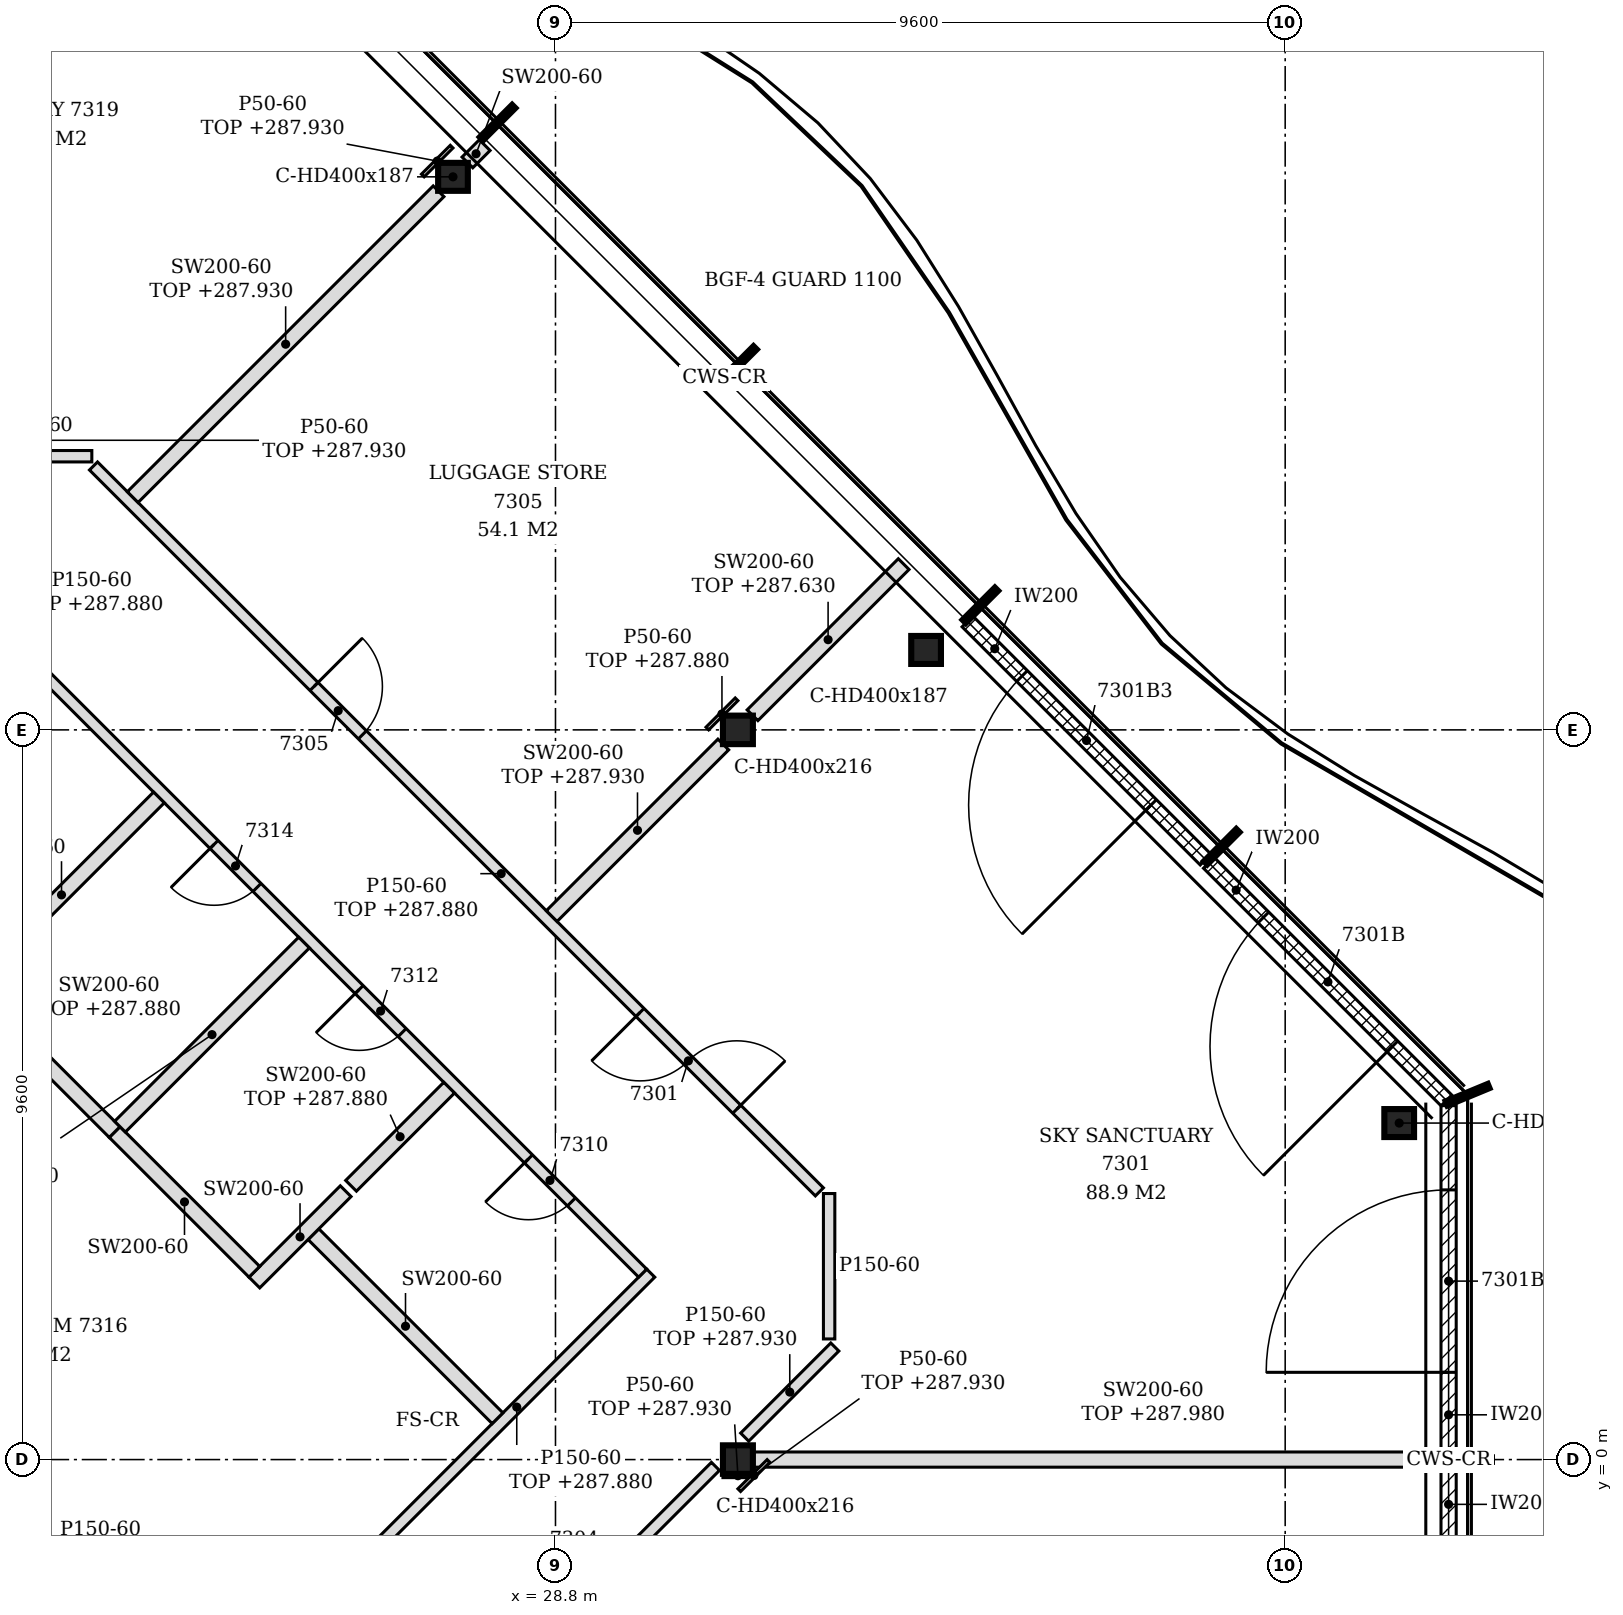
"""IFC4 building model, lengths in metres.
Left out: names, types, materials, properties, quantities, classifications, styles, units other than length and angle.
Written with IfcOpenShell. Run it as: python <this file> out.ifc"""

import sys

from ifc_helpers import new_model, si_unit, direction, frame, frame_2d, origin, origin_2d, place, context, subcontext, project, spatial, polyline, rectangle, i_section, outline, extrude, element, fill, save


model = new_model("IFC4")
c1 = context("Model", 3, precision=1e-05, world=origin(), true_north=direction((0.0, 1.0)))
c2 = subcontext(c1, "Body", "Model", "MODEL_VIEW")
j1 = project(units=[si_unit("LENGTHUNIT", "METRE"), si_unit("PLANEANGLEUNIT", "RADIAN")], contexts=[c1])
p1 = place(None, origin())
s1 = spatial("IfcSite", under=j1, at=p1, CompositionType="ELEMENT")
p2 = place(p1, origin())
s2 = spatial("IfcBuilding", under=s1, at=p2, CompositionType="ELEMENT")
p3 = place(p2, frame((0.0, 0.0, 285.0)))
s3 = spatial("IfcBuildingStorey", under=s2, at=p3, CompositionType="ELEMENT", Elevation=285.0)
for number, where, z_axis, x_axis in (
    (1, (39.9, 4.427, -0.15), (0.0, 0.0, 1.0), (1.0, 0.0, 0.0)),
    (2, (33.676, 10.652, -0.15), (0.0, 0.0, 1.0), (1.0, 0.0, 0.0)),
    (3, (27.451, 16.876, -0.15), (0.0, 0.0, 1.0), (1.0, 0.0, 0.0)),
):
    element("IfcColumn", number, at=place(p3, frame(where, z_axis=z_axis, x_axis=x_axis)), inside=s3, PredefinedType="COLUMN", context=c2, shape_type="SweptSolid", body=[
        extrude(i_section(OverallWidth=0.391, OverallDepth=0.368, WebThickness=0.015, FlangeThickness=0.024, FilletRadius=0.015, at=origin_2d()), origin(), (0.0, 0.0, 1.0), 3.6),
    ])
for number, where, z_axis, x_axis in (
    (4, (31.2, 0.0, -0.15), (0.0, 0.0, 1.0), (1.0, 0.0, 0.0)),
    (5, (31.2, 9.6, -0.15), (0.0, 0.0, 1.0), (1.0, 0.0, 0.0)),
):
    element("IfcColumn", number, at=place(p3, frame(where, z_axis=z_axis, x_axis=x_axis)), inside=s3, PredefinedType="COLUMN", context=c2, shape_type="SweptSolid", body=[
        extrude(i_section(OverallWidth=0.394, OverallDepth=0.375, WebThickness=0.017, FlangeThickness=0.028, FilletRadius=0.015, at=origin_2d()), origin(), (0.0, 0.0, 1.0), 3.6),
    ])
p4 = place(p3, frame((40.55, -4.656, 0.0), z_axis=(0.0, 0.0, 1.0), x_axis=(0.0, 1.0, 0.0)))
e6 = element("IfcWall", 6, at=p4, inside=s3, PredefinedType="NOTDEFINED", context=c2, shape_type="SweptSolid", body=[
    extrude(rectangle(XDim=4.626, YDim=0.2, at=frame_2d((2.313, 0.0))), origin(), (0.0, 0.0, 1.0), 3.45),
])
p5 = place(p4, frame((1.108, 0.0, 0.0)))
e7 = element("IfcOpeningElement", 7, at=p5, cuts=e6, PredefinedType="OPENING", context=c2, shape_type="SweptSolid", body=[
    extrude(rectangle(XDim=2.4, YDim=2.4, at=frame_2d((1.2, 1.2))), frame((0.0, 0.11, 0.0), z_axis=(0.0, -1.0, 0.0), x_axis=(1.0, 0.0, 0.0)), (0.0, 0.0, 1.0), 0.22),
])
p6 = place(p3, frame((40.55, 0.03, 0.0), z_axis=(0.0, 0.0, 1.0), x_axis=(0.0, 1.0, 0.0)))
e8 = element("IfcWall", 8, at=p6, inside=s3, PredefinedType="NOTDEFINED", context=c2, shape_type="SweptSolid", body=[
    extrude(rectangle(XDim=4.626, YDim=0.2, at=frame_2d((2.313, 0.0))), origin(), (0.0, 0.0, 1.0), 3.45),
])
p7 = place(p6, frame((1.118, 0.0, 0.0)))
e9 = element("IfcOpeningElement", 9, at=p7, cuts=e8, PredefinedType="OPENING", context=c2, shape_type="SweptSolid", body=[
    extrude(rectangle(XDim=2.4, YDim=2.4, at=frame_2d((1.2, 1.2))), frame((0.0, 0.11, 0.0), z_axis=(0.0, -1.0, 0.0), x_axis=(1.0, 0.0, 0.0)), (0.0, 0.0, 1.0), 0.22),
])
p8 = place(p3, frame((40.522, 4.725, 0.0), z_axis=(0.0, 0.0, 1.0), x_axis=(-0.707106781187, 0.707106781187, 0.0)))
e10 = element("IfcWall", 10, at=p8, inside=s3, PredefinedType="NOTDEFINED", context=c2, shape_type="SweptSolid", body=[
    extrude(rectangle(XDim=4.421, YDim=0.2, at=frame_2d((2.21, 0.0))), origin(), (0.0, 0.0, 1.0), 3.45),
])
p9 = place(p8, frame((1.005, 0.0, 0.0)))
e11 = element("IfcOpeningElement", 11, at=p9, cuts=e10, PredefinedType="OPENING", context=c2, shape_type="SweptSolid", body=[
    extrude(rectangle(XDim=2.4, YDim=2.4, at=frame_2d((1.2, 1.2))), frame((0.0, 0.11, 0.0), z_axis=(0.0, -1.0, 0.0), x_axis=(1.0, 0.0, 0.0)), (0.0, 0.0, 1.0), 0.22),
])
p10 = place(p3, frame((37.353, 7.893, 0.0), z_axis=(0.0, 0.0, 1.0), x_axis=(-0.707134329907, 0.707079231393, 0.0)))
e12 = element("IfcWall", 12, at=p10, inside=s3, PredefinedType="NOTDEFINED", context=c2, shape_type="SweptSolid", body=[
    extrude(rectangle(XDim=4.431, YDim=0.2, at=frame_2d((2.215, 0.0))), origin(), (0.0, 0.0, 1.0), 3.45),
])
p11 = place(p10, frame((1.015, 0.0, 0.0)))
e13 = element("IfcOpeningElement", 13, at=p11, cuts=e12, PredefinedType="OPENING", context=c2, shape_type="SweptSolid", body=[
    extrude(rectangle(XDim=2.4, YDim=2.4, at=frame_2d((1.2, 1.2))), frame((0.0, 0.11, 0.0), z_axis=(0.0, -1.0, 0.0), x_axis=(1.0, 0.0, 0.0)), (0.0, 0.0, 1.0), 0.22),
])
p12 = place(p3, frame((15.497, -15.497, 0.0), z_axis=(0.0, 0.0, 1.0), x_axis=(0.707106781187, 0.707106781187, 0.0)))
e14 = element("IfcWall", 14, at=p12, inside=s3, PredefinedType="PARTITIONING", context=c2, shape_type="SweptSolid", body=[
    extrude(rectangle(XDim=21.79, YDim=0.15, at=frame_2d((10.895, 0.0))), origin(), (0.0, 0.0, 1.0), 2.73),
])
p13 = place(p12, frame((4.927, 0.0, 0.0)))
e15 = element("IfcOpeningElement", 15, at=p13, cuts=e14, PredefinedType="OPENING", context=c2, shape_type="SweptSolid", body=[
    extrude(rectangle(XDim=0.9, YDim=2.1, at=frame_2d((0.45, 1.05))), frame((0.0, 0.085, 0.0), z_axis=(0.0, -1.0, 0.0), x_axis=(1.0, 0.0, 0.0)), (0.0, 0.0, 1.0), 0.17),
])
p14 = place(p12, frame((10.926, 0.0, 0.0)))
e16 = element("IfcOpeningElement", 16, at=p14, cuts=e14, PredefinedType="OPENING", context=c2, shape_type="SweptSolid", body=[
    extrude(rectangle(XDim=0.9, YDim=2.1, at=frame_2d((0.45, 1.05))), frame((0.0, 0.085, 0.0), z_axis=(0.0, -1.0, 0.0), x_axis=(1.0, 0.0, 0.0)), (0.0, 0.0, 1.0), 0.17),
])
p15 = place(p12, frame((19.345, 0.0, 0.0)))
e17 = element("IfcOpeningElement", 17, at=p15, cuts=e14, PredefinedType="OPENING", context=c2, shape_type="SweptSolid", body=[
    extrude(rectangle(XDim=0.9, YDim=2.1, at=frame_2d((0.45, 1.05))), frame((0.0, 0.085, 0.0), z_axis=(0.0, -1.0, 0.0), x_axis=(1.0, 0.0, 0.0)), (0.0, 0.0, 1.0), 0.17),
])
p16 = place(p3, frame((26.528, -1.072, 0.0), z_axis=(0.0, 0.0, 1.0), x_axis=(0.707106781187, 0.707106781187, 0.0)))
e18 = element("IfcWall", 18, at=p16, inside=s3, PredefinedType="PARTITIONING", context=c2, shape_type="SweptSolid", body=[
    extrude(rectangle(XDim=4.985, YDim=0.15, at=frame_2d((2.492, 0.0))), origin(), (0.0, 0.0, 1.0), 2.88),
])
p17 = place(p3, frame((31.397, 0.0, 0.0), z_axis=(0.0, 0.0, 1.0), x_axis=(1.0, 0.0, 0.0)))
e19 = element("IfcWall", 19, at=p17, inside=s3, PredefinedType="PARTITIONING", context=c2, shape_type="SweptSolid", body=[
    extrude(outline(polyline([(0.0, 0.0), (9.053, 0.0), (9.053, 2.98), (8.653, 2.98), (8.651, 2.93), (8.353, 2.93), (8.351, 2.98), (0.0, 2.98), (0.0, 0.0)])), frame((0.0, 0.1, 0.0), z_axis=(0.0, -1.0, 0.0), x_axis=(1.0, 0.0, 0.0)), (0.0, 0.0, 1.0), 0.2),
])
p18 = place(p3, frame((31.289, 0.295, 0.0), z_axis=(0.0, 0.0, 1.0), x_axis=(0.707179577478, 0.7070339774, 0.0)))
e20 = element("IfcWall", 20, at=p18, inside=s3, PredefinedType="PARTITIONING", context=c2, shape_type="SweptSolid", body=[
    extrude(rectangle(XDim=1.677, YDim=0.15, at=frame_2d((0.838, 0.0))), origin(), (0.0, 0.0, 1.0), 2.93),
])
p19 = place(p3, frame((28.038, 0.544, 0.0), z_axis=(0.0, 0.0, 1.0), x_axis=(-0.707213699878, 0.706999846325, 0.0)))
e21 = element("IfcWall", 21, at=p19, inside=s3, PredefinedType="PARTITIONING", context=c2, shape_type="SweptSolid", body=[
    extrude(rectangle(XDim=3.425, YDim=0.2, at=frame_2d((1.712, 0.0))), origin(), (0.0, 0.0, 1.0), 3.45),
])
p20 = place(p3, frame((32.4, 1.587, 0.0), z_axis=(0.0, 0.0, 1.0), x_axis=(0.0, 1.0, 0.0)))
e22 = element("IfcWall", 22, at=p20, inside=s3, PredefinedType="PARTITIONING", context=c2, shape_type="SweptSolid", body=[
    extrude(rectangle(XDim=1.913, YDim=0.15, at=frame_2d((0.957, 0.0))), origin(), (0.0, 0.0, 1.0), 3.45),
])
p21 = place(p3, frame((24.838, 2.329, 0.0), z_axis=(0.0, 0.0, 1.0), x_axis=(0.707034938994, 0.70717861608, 0.0)))
e23 = element("IfcWall", 23, at=p21, inside=s3, PredefinedType="PARTITIONING", context=c2, shape_type="SweptSolid", body=[
    extrude(rectangle(XDim=1.699, YDim=0.2, at=frame_2d((0.85, 0.0))), origin(), (0.0, 0.0, 1.0), 3.45),
])
p22 = place(p3, frame((24.838, 2.471, 0.0), z_axis=(0.0, 0.0, 1.0), x_axis=(-0.707106781187, 0.707106781187, 0.0)))
e24 = element("IfcWall", 24, at=p22, inside=s3, PredefinedType="PARTITIONING", context=c2, shape_type="SweptSolid", body=[
    extrude(rectangle(XDim=2.6, YDim=0.2, at=frame_2d((1.3, 0.0))), origin(), (0.0, 0.0, 1.0), 3.45),
])
p23 = place(p3, frame((29.947, 2.453, 0.0), z_axis=(0.0, 0.0, 1.0), x_axis=(-0.707098603185, 0.707114959093, 0.0)))
e25 = element("IfcWall", 25, at=p23, inside=s3, PredefinedType="PARTITIONING", context=c2, shape_type="SweptSolid", body=[
    extrude(rectangle(XDim=14.927, YDim=0.15, at=frame_2d((7.463, 0.0))), origin(), (0.0, 0.0, 1.0), 2.88),
])
p24 = place(p23, frame((1.325, 0.0, 0.0)))
e26 = element("IfcOpeningElement", 26, at=p24, cuts=e25, PredefinedType="OPENING", context=c2, shape_type="SweptSolid", body=[
    extrude(rectangle(XDim=0.8, YDim=2.1, at=frame_2d((0.4, 1.05))), frame((0.0, 0.085, 0.0), z_axis=(0.0, -1.0, 0.0), x_axis=(1.0, 0.0, 0.0)), (0.0, 0.0, 1.0), 0.17),
])
p25 = place(p23, frame((4.476, 0.0, 0.0)))
e27 = element("IfcOpeningElement", 27, at=p25, cuts=e25, PredefinedType="OPENING", context=c2, shape_type="SweptSolid", body=[
    extrude(rectangle(XDim=0.8, YDim=2.1, at=frame_2d((0.4, 1.05))), frame((0.0, 0.085, 0.0), z_axis=(0.0, -1.0, 0.0), x_axis=(1.0, 0.0, 0.0)), (0.0, 0.0, 1.0), 0.17),
])
p26 = place(p23, frame((7.175, 0.0, 0.0)))
e28 = element("IfcOpeningElement", 28, at=p26, cuts=e25, PredefinedType="OPENING", context=c2, shape_type="SweptSolid", body=[
    extrude(rectangle(XDim=0.8, YDim=2.1, at=frame_2d((0.4, 1.05))), frame((0.0, 0.085, 0.0), z_axis=(0.0, -1.0, 0.0), x_axis=(1.0, 0.0, 0.0)), (0.0, 0.0, 1.0), 0.17),
])
p27 = place(p3, frame((32.272, 3.522, 0.0), z_axis=(0.0, 0.0, 1.0), x_axis=(-0.707097742657, 0.707115819601, 0.0)))
e29 = element("IfcWall", 29, at=p27, inside=s3, PredefinedType="PARTITIONING", context=c2, shape_type="SweptSolid", body=[
    extrude(rectangle(XDim=13.506, YDim=0.15, at=frame_2d((6.753, 0.0))), origin(), (0.0, 0.0, 1.0), 2.88),
])
p28 = place(p27, frame((1.538, 0.0, 0.0)))
e30 = element("IfcOpeningElement", 30, at=p28, cuts=e29, PredefinedType="OPENING", context=c2, shape_type="SweptSolid", body=[
    extrude(rectangle(XDim=1.8, YDim=2.1, at=frame_2d((0.9, 1.05))), frame((0.0, 0.085, 0.0), z_axis=(0.0, -1.0, 0.0), x_axis=(1.0, 0.0, 0.0)), (0.0, 0.0, 1.0), 0.17),
])
p29 = place(p27, frame((8.503, 0.0, 0.0)))
e31 = element("IfcOpeningElement", 31, at=p29, cuts=e29, PredefinedType="OPENING", context=c2, shape_type="SweptSolid", body=[
    extrude(rectangle(XDim=0.9, YDim=2.1, at=frame_2d((0.45, 1.05))), frame((0.0, 0.085, 0.0), z_axis=(0.0, -1.0, 0.0), x_axis=(1.0, 0.0, 0.0)), (0.0, 0.0, 1.0), 0.17),
])
p30 = place(p3, frame((26.111, 3.602, 0.0), z_axis=(0.0, 0.0, 1.0), x_axis=(0.706906117117, 0.707307388328, 0.0)))
e32 = element("IfcWall", 32, at=p30, inside=s3, PredefinedType="PARTITIONING", context=c2, shape_type="SweptSolid", body=[
    extrude(rectangle(XDim=1.825, YDim=0.2, at=frame_2d((0.913, 0.0))), origin(), (0.0, 0.0, 1.0), 2.88),
])
p31 = place(p3, frame((23.0, 4.309, 0.0), z_axis=(0.0, 0.0, 1.0), x_axis=(-0.707294541873, 0.70691897063, 0.0)))
e33 = element("IfcWall", 33, at=p31, inside=s3, PredefinedType="PARTITIONING", context=c2, shape_type="SweptSolid", body=[
    extrude(rectangle(XDim=2.6, YDim=0.2, at=frame_2d((1.3, 0.0))), origin(), (0.0, 0.0, 1.0), 2.88),
])
p32 = place(p3, frame((23.071, 4.38, 0.0), z_axis=(0.0, 0.0, 1.0), x_axis=(0.706928547439, 0.70728497002, 0.0)))
e34 = element("IfcWall", 34, at=p32, inside=s3, PredefinedType="PARTITIONING", context=c2, shape_type="SweptSolid", body=[
    extrude(rectangle(XDim=3.425, YDim=0.2, at=frame_2d((1.712, 0.0))), origin(), (0.0, 0.0, 1.0), 2.88),
])
p33 = place(p3, frame((21.019, 6.147, 0.0), z_axis=(0.0, 0.0, 1.0), x_axis=(0.707106781187, 0.707106781187, 0.0)))
e35 = element("IfcWall", 35, at=p33, inside=s3, PredefinedType="PARTITIONING", context=c2, shape_type="SweptSolid", body=[
    extrude(rectangle(XDim=3.626, YDim=0.2, at=frame_2d((1.813, 0.0))), origin(), (0.0, 0.0, 1.0), 3.45),
])
p34 = place(p3, frame((28.75, 7.15, 0.0), z_axis=(0.0, 0.0, 1.0), x_axis=(0.707106781187, 0.707106781187, 0.0)))
e36 = element("IfcWall", 36, at=p34, inside=s3, PredefinedType="PARTITIONING", context=c2, shape_type="SweptSolid", body=[
    extrude(rectangle(XDim=3.193, YDim=0.2, at=frame_2d((1.597, 0.0))), origin(), (0.0, 0.0, 1.0), 2.93),
])
p35 = place(p3, frame((31.392, 9.792, 0.0), z_axis=(0.0, 0.0, 1.0), x_axis=(0.707106781187, 0.707106781187, 0.0)))
e37 = element("IfcWall", 37, at=p35, inside=s3, PredefinedType="PARTITIONING", context=c2, shape_type="SweptSolid", body=[
    extrude(rectangle(XDim=2.812, YDim=0.2, at=frame_2d((1.406, 0.0))), origin(), (0.0, 0.0, 1.0), 2.63),
])
p36 = place(p3, frame((23.238, 12.662, 0.0), z_axis=(0.0, 0.0, 1.0), x_axis=(0.707106781187, 0.707106781187, 0.0)))
e38 = element("IfcWall", 38, at=p36, inside=s3, PredefinedType="PARTITIONING", context=c2, shape_type="SweptSolid", body=[
    extrude(rectangle(XDim=5.69, YDim=0.2, at=frame_2d((2.845, 0.0))), origin(), (0.0, 0.0, 1.0), 2.93),
])
p37 = place(p3, frame((19.397, 13.2, 0.0), z_axis=(0.0, 0.0, 1.0), x_axis=(1.0, 0.0, 0.0)))
e39 = element("IfcWall", 39, at=p37, inside=s3, PredefinedType="PARTITIONING", context=c2, shape_type="SweptSolid", body=[
    extrude(rectangle(XDim=3.303, YDim=0.15, at=frame_2d((1.652, 0.0))), origin(), (0.0, 0.0, 1.0), 3.45),
])
p38 = place(p37, frame((1.05, 0.0, 0.0)))
e40 = element("IfcOpeningElement", 40, at=p38, cuts=e39, PredefinedType="OPENING", context=c2, shape_type="SweptSolid", body=[
    extrude(rectangle(XDim=0.9, YDim=2.1, at=frame_2d((0.45, 1.05))), frame((0.0, 0.085, 0.0), z_axis=(0.0, -1.0, 0.0), x_axis=(1.0, 0.0, 0.0)), (0.0, 0.0, 1.0), 0.17),
])
p39 = place(p3, frame((27.641, 17.065, 0.0), z_axis=(0.0, 0.0, 1.0), x_axis=(0.707106781187, 0.707106781187, 0.0)))
e41 = element("IfcWall", 41, at=p39, inside=s3, PredefinedType="PARTITIONING", context=c2, shape_type="SweptSolid", body=[
    extrude(rectangle(XDim=0.322, YDim=0.2, at=frame_2d((0.161, 0.0))), origin(), (0.0, 0.0, 1.0), 3.45),
])
p40 = place(p3, frame((31.218, -0.402, 0.0), z_axis=(0.0, 0.0, 1.0), x_axis=(0.707106781187, 0.707106781187, 0.0)))
e42 = element("IfcWall", 42, at=p40, inside=s3, PredefinedType="PARTITIONING", context=c2, shape_type="SweptSolid", body=[
    extrude(rectangle(XDim=0.544, YDim=0.05, at=frame_2d((0.272, 0.0))), origin(), (0.0, 0.0, 1.0), 2.93),
])
p41 = place(p3, frame((31.003, -0.212, 0.0), z_axis=(0.0, 0.0, 1.0), x_axis=(1.0, 0.0, 0.0)))
e43 = element("IfcWall", 43, at=p41, inside=s3, PredefinedType="PARTITIONING", context=c2, shape_type="SweptSolid", body=[
    extrude(rectangle(XDim=0.394, YDim=0.05, at=frame_2d((0.197, 0.0))), origin(), (0.0, 0.0, 1.0), 2.93),
])
p42 = place(p3, frame((30.798, 9.618, 0.0), z_axis=(0.0, 0.0, 1.0), x_axis=(0.707106781187, 0.707106781187, 0.0)))
e44 = element("IfcWall", 44, at=p42, inside=s3, PredefinedType="PARTITIONING", context=c2, shape_type="SweptSolid", body=[
    extrude(rectangle(XDim=0.544, YDim=0.05, at=frame_2d((0.272, 0.0))), origin(), (0.0, 0.0, 1.0), 2.88),
])
p43 = place(p3, frame((27.054, 16.893, 0.0), z_axis=(0.0, 0.0, 1.0), x_axis=(0.707106781187, 0.707106781187, 0.0)))
e45 = element("IfcWall", 45, at=p43, inside=s3, PredefinedType="PARTITIONING", context=c2, shape_type="SweptSolid", body=[
    extrude(rectangle(XDim=0.537, YDim=0.05, at=frame_2d((0.269, 0.0))), origin(), (0.0, 0.0, 1.0), 2.93),
])
p44 = place(p7, origin())
e46 = element("IfcDoor", 46, at=p44, inside=s3, OperationType="SINGLE_SWING_LEFT", PredefinedType="DOOR", context=c2, shape_type="SweptSolid", body=[
    extrude(rectangle(XDim=2.4, YDim=2.4, at=frame_2d((1.2, 1.2))), frame((0.0, 0.025, 0.0), z_axis=(0.0, -1.0, 0.0), x_axis=(1.0, 0.0, 0.0)), (0.0, 0.0, 1.0), 0.05),
])
fill(e9, e46)
p45 = place(p9, origin())
e47 = element("IfcDoor", 47, at=p45, inside=s3, OperationType="SINGLE_SWING_LEFT", PredefinedType="DOOR", context=c2, shape_type="SweptSolid", body=[
    extrude(rectangle(XDim=2.4, YDim=2.4, at=frame_2d((1.2, 1.2))), frame((0.0, 0.025, 0.0), z_axis=(0.0, -1.0, 0.0), x_axis=(1.0, 0.0, 0.0)), (0.0, 0.0, 1.0), 0.05),
])
fill(e11, e47)
p46 = place(p11, origin())
e48 = element("IfcDoor", 48, at=p46, inside=s3, OperationType="SINGLE_SWING_LEFT", PredefinedType="DOOR", context=c2, shape_type="SweptSolid", body=[
    extrude(rectangle(XDim=2.4, YDim=2.4, at=frame_2d((1.2, 1.2))), frame((0.0, 0.025, 0.0), z_axis=(0.0, -1.0, 0.0), x_axis=(1.0, 0.0, 0.0)), (0.0, 0.0, 1.0), 0.05),
])
fill(e13, e48)
p47 = place(p28, frame((1.8, 0.0, 0.0), z_axis=(0.0, 0.0, 1.0), x_axis=(-1.0, 0.0, 0.0)))
e49 = element("IfcDoor", 49, at=p47, inside=s3, OperationType="DOUBLE_DOOR_SINGLE_SWING", PredefinedType="DOOR", context=c2, shape_type="SweptSolid", body=[
    extrude(rectangle(XDim=1.8, YDim=2.1, at=frame_2d((0.9, 1.05))), frame((0.0, 0.025, 0.0), z_axis=(0.0, -1.0, 0.0), x_axis=(1.0, 0.0, 0.0)), (0.0, 0.0, 1.0), 0.05),
])
fill(e30, e49)
p48 = place(p29, frame((0.9, 0.0, 0.0), z_axis=(0.0, 0.0, 1.0), x_axis=(-1.0, 0.0, 0.0)))
e50 = element("IfcDoor", 50, at=p48, inside=s3, OperationType="SINGLE_SWING_LEFT", PredefinedType="DOOR", context=c2, shape_type="SweptSolid", body=[
    extrude(rectangle(XDim=0.9, YDim=2.1, at=frame_2d((0.45, 1.05))), frame((0.0, 0.025, 0.0), z_axis=(0.0, -1.0, 0.0), x_axis=(1.0, 0.0, 0.0)), (0.0, 0.0, 1.0), 0.05),
])
fill(e31, e50)
p49 = place(p24, origin())
e51 = element("IfcDoor", 51, at=p49, inside=s3, OperationType="SINGLE_SWING_RIGHT", PredefinedType="DOOR", context=c2, shape_type="SweptSolid", body=[
    extrude(rectangle(XDim=0.8, YDim=2.1, at=frame_2d((0.4, 1.05))), frame((0.0, 0.025, 0.0), z_axis=(0.0, -1.0, 0.0), x_axis=(1.0, 0.0, 0.0)), (0.0, 0.0, 1.0), 0.05),
])
fill(e26, e51)
p50 = place(p25, origin())
e52 = element("IfcDoor", 52, at=p50, inside=s3, OperationType="SINGLE_SWING_RIGHT", PredefinedType="DOOR", context=c2, shape_type="SweptSolid", body=[
    extrude(rectangle(XDim=0.8, YDim=2.1, at=frame_2d((0.4, 1.05))), frame((0.0, 0.025, 0.0), z_axis=(0.0, -1.0, 0.0), x_axis=(1.0, 0.0, 0.0)), (0.0, 0.0, 1.0), 0.05),
])
fill(e27, e52)
p51 = place(p26, origin())
e53 = element("IfcDoor", 53, at=p51, inside=s3, OperationType="SINGLE_SWING_RIGHT", PredefinedType="DOOR", context=c2, shape_type="SweptSolid", body=[
    extrude(rectangle(XDim=0.8, YDim=2.1, at=frame_2d((0.4, 1.05))), frame((0.0, 0.025, 0.0), z_axis=(0.0, -1.0, 0.0), x_axis=(1.0, 0.0, 0.0)), (0.0, 0.0, 1.0), 0.05),
])
fill(e28, e53)
save(model, sys.argv[1])
